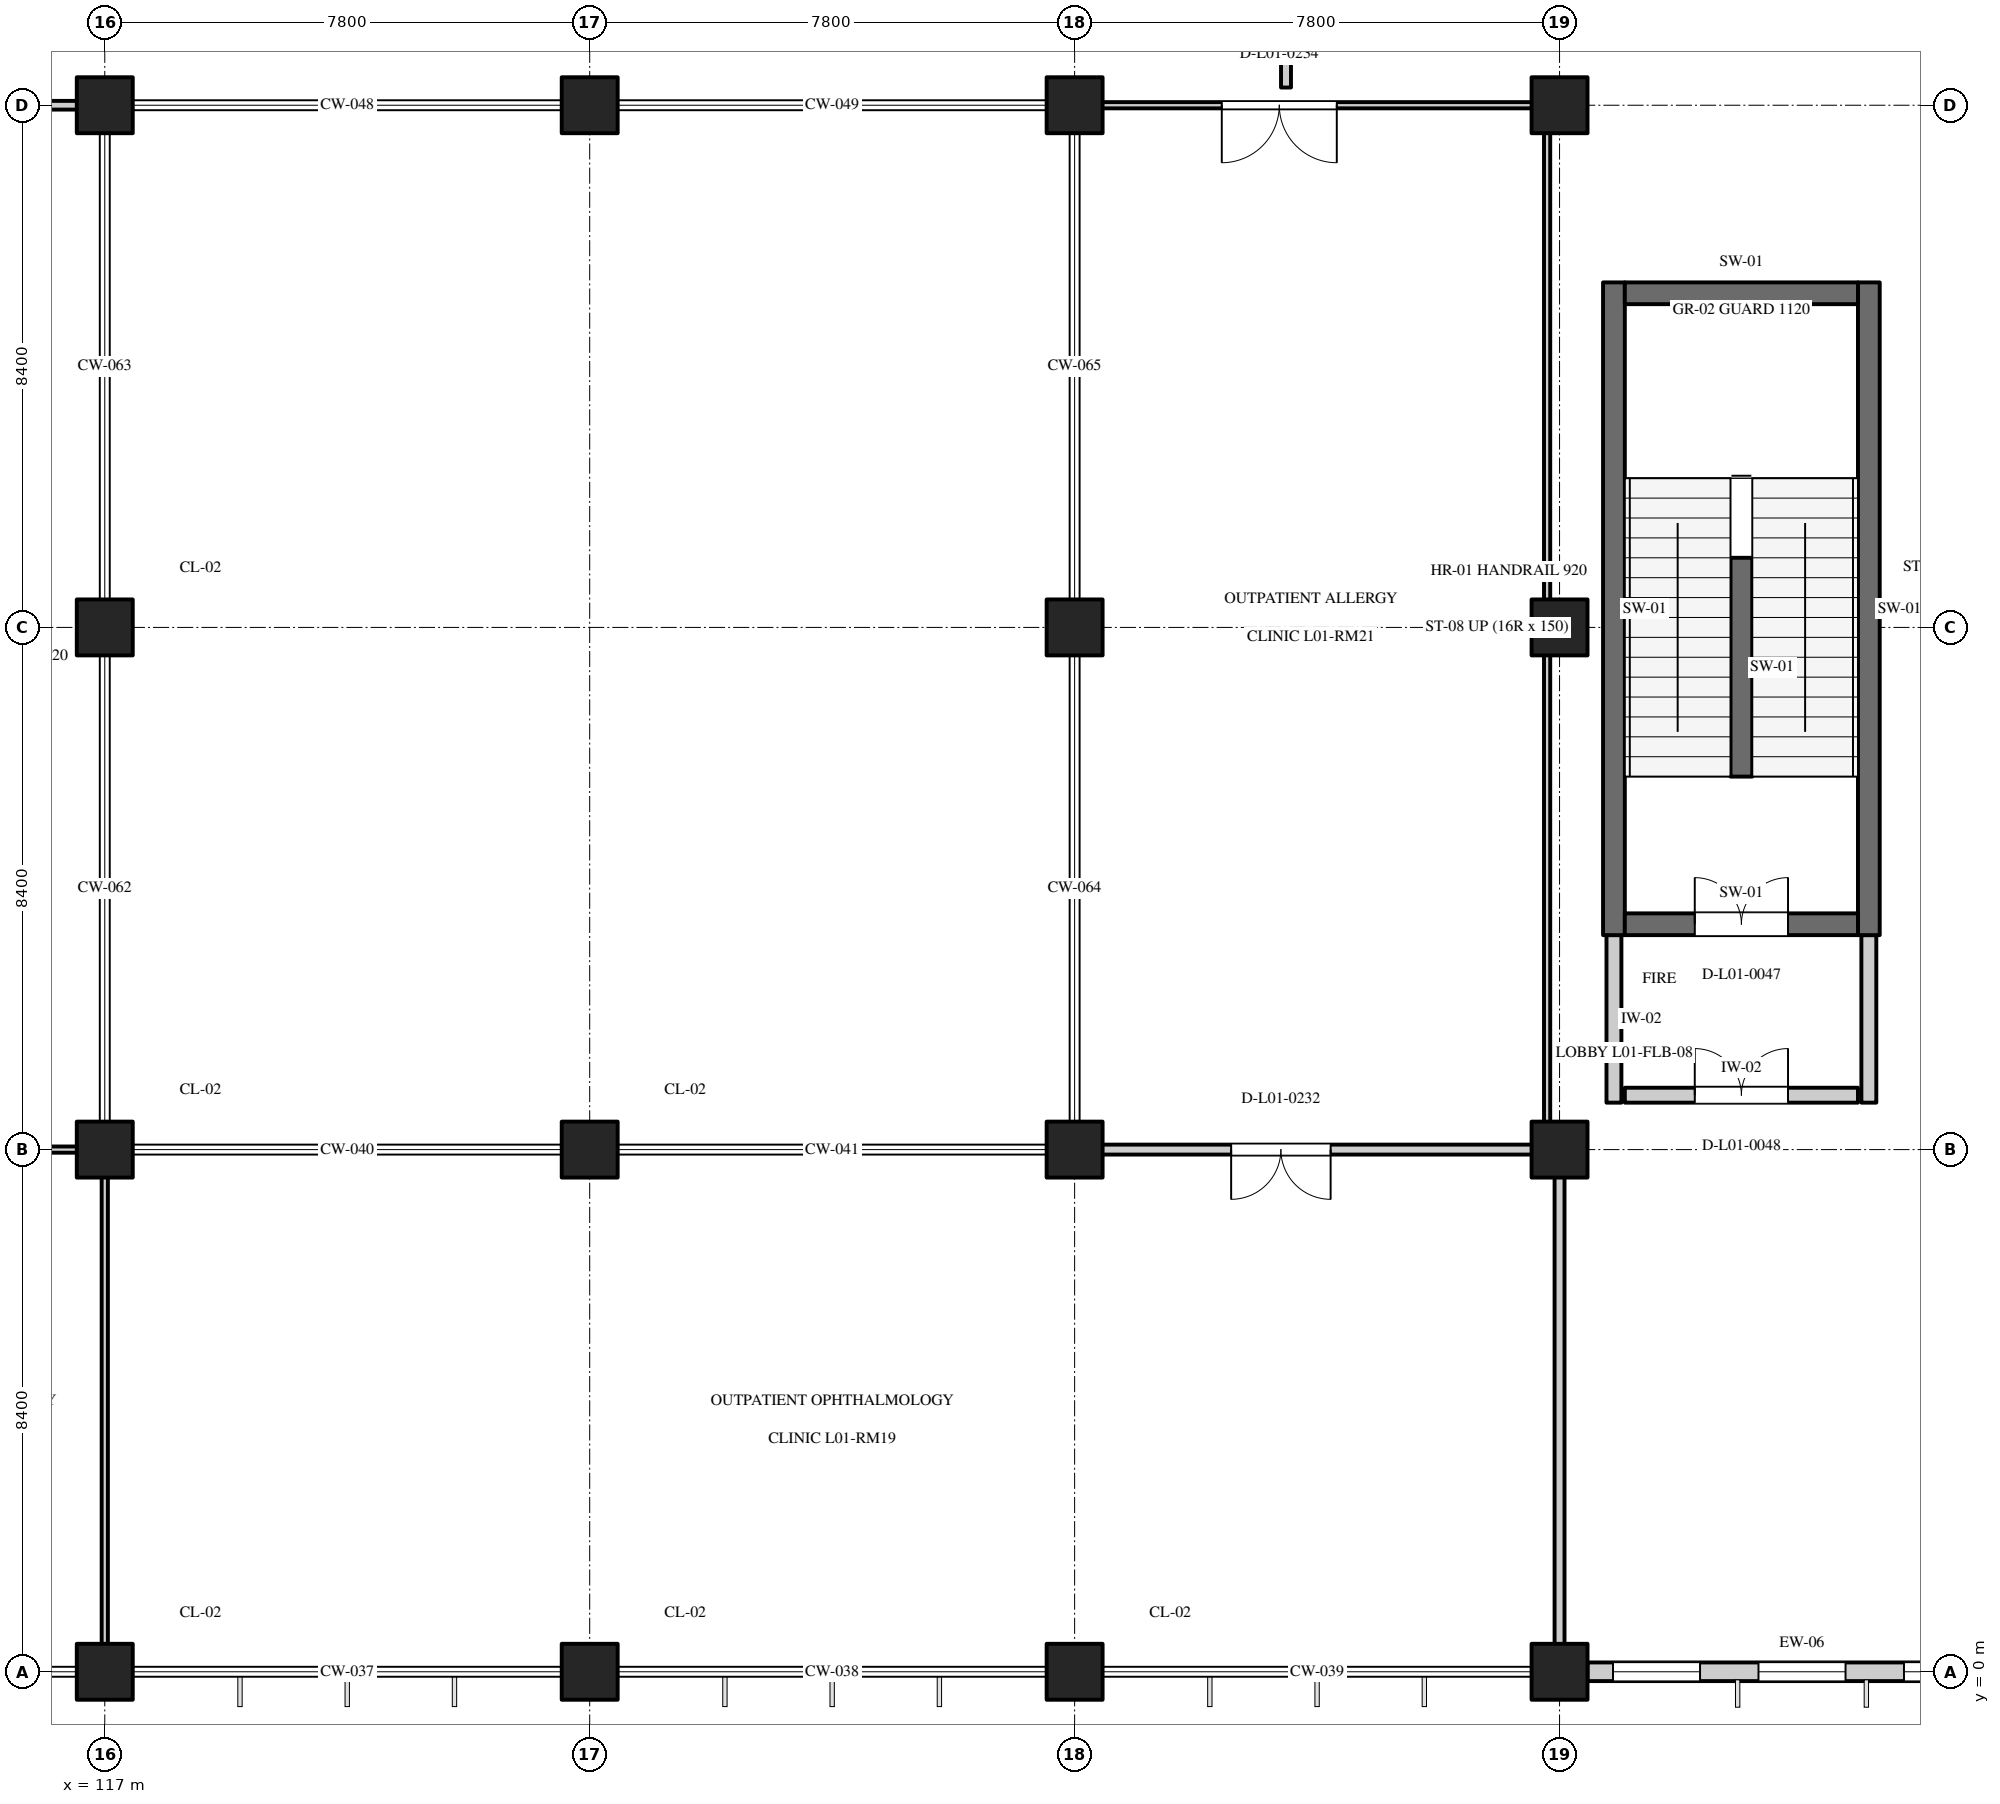
"""IFC4 building model, lengths in metres.
Left out: names, types, materials, properties, quantities, classifications, styles, units other than length and angle.
Written with IfcOpenShell. Run it as: python <this file> out.ifc"""

import sys

from ifc_helpers import new_model, si_unit, direction, frame, frame_2d, origin, origin_2d, place, context, subcontext, project, spatial, rectangle, extrude, element, fill, save


model = new_model("IFC4")
c1 = context("Model", 3, precision=1e-05, world=origin(), true_north=direction((0.0, 1.0)))
c2 = subcontext(c1, "Body", "Model", "MODEL_VIEW")
j1 = project(units=[si_unit("LENGTHUNIT", "METRE"), si_unit("PLANEANGLEUNIT", "RADIAN")], contexts=[c1])
p1 = place(None, origin())
s1 = spatial("IfcSite", under=j1, at=p1, CompositionType="ELEMENT")
p2 = place(p1, origin())
s2 = spatial("IfcBuilding", under=s1, at=p2, CompositionType="ELEMENT")
p3 = place(p2, frame((0.0, 0.0, 4.8)))
s3 = spatial("IfcBuildingStorey", under=s2, at=p3, CompositionType="ELEMENT", Elevation=4.8)
for number, where, z_axis, x_axis in (
    (1, (117.0, 0.0, 0.0), (0.0, 0.0, 1.0), (1.0, 0.0, 0.0)),
    (2, (117.0, 8.4, 0.0), (0.0, 0.0, 1.0), (1.0, 0.0, 0.0)),
    (3, (117.0, 16.8, 0.0), (0.0, 0.0, 1.0), (1.0, 0.0, 0.0)),
    (4, (117.0, 25.2, 0.0), (0.0, 0.0, 1.0), (1.0, 0.0, 0.0)),
    (5, (124.8, 0.0, 0.0), (0.0, 0.0, 1.0), (1.0, 0.0, 0.0)),
    (6, (124.8, 8.4, 0.0), (0.0, 0.0, 1.0), (1.0, 0.0, 0.0)),
    (7, (124.8, 25.2, 0.0), (0.0, 0.0, 1.0), (1.0, 0.0, 0.0)),
    (8, (132.6, 0.0, 0.0), (0.0, 0.0, 1.0), (1.0, 0.0, 0.0)),
    (9, (132.6, 8.4, 0.0), (0.0, 0.0, 1.0), (1.0, 0.0, 0.0)),
    (10, (132.6, 16.8, 0.0), (0.0, 0.0, 1.0), (1.0, 0.0, 0.0)),
    (11, (132.6, 25.2, 0.0), (0.0, 0.0, 1.0), (1.0, 0.0, 0.0)),
    (12, (140.4, 0.0, 0.0), (0.0, 0.0, 1.0), (1.0, 0.0, 0.0)),
    (13, (140.4, 8.4, 0.0), (0.0, 0.0, 1.0), (1.0, 0.0, 0.0)),
    (14, (140.4, 16.8, 0.0), (0.0, 0.0, 1.0), (1.0, 0.0, 0.0)),
    (15, (140.4, 25.2, 0.0), (0.0, 0.0, 1.0), (1.0, 0.0, 0.0)),
):
    element("IfcColumn", number, at=place(p3, frame(where, z_axis=z_axis, x_axis=x_axis)), inside=s3, PredefinedType="COLUMN", context=c2, shape_type="SweptSolid", body=[
        extrude(rectangle(XDim=0.9, YDim=0.9, at=origin_2d()), origin(), (0.0, 0.0, 1.0), 4.8),
    ])
p4 = place(p3, frame((140.85, 0.0, 0.0), z_axis=(0.0, 0.0, 1.0), x_axis=(1.0, 0.0, 0.0)))
e16 = element("IfcWall", 16, at=p4, inside=s3, PredefinedType="STANDARD", context=c2, shape_type="SweptSolid", body=[
    extrude(rectangle(XDim=6.9, YDim=0.3, at=frame_2d((3.45, 0.0))), origin(), (0.0, 0.0, 1.0), 3.75),
])
p5 = place(p4, frame((0.41, 0.0, 0.75)))
e17 = element("IfcOpeningElement", 17, at=p5, cuts=e16, PredefinedType="OPENING", context=c2, shape_type="SweptSolid", body=[
    extrude(rectangle(XDim=1.4, YDim=1.6, at=frame_2d((0.7, 0.8))), frame((0.0, 0.162, 0.0), z_axis=(0.0, -1.0, 0.0), x_axis=(1.0, 0.0, 0.0)), (0.0, 0.0, 1.0), 0.324),
])
p6 = place(p4, frame((2.75, 0.0, 0.75)))
e18 = element("IfcOpeningElement", 18, at=p6, cuts=e16, PredefinedType="OPENING", context=c2, shape_type="SweptSolid", body=[
    extrude(rectangle(XDim=1.4, YDim=1.6, at=frame_2d((0.7, 0.8))), frame((0.0, 0.162, 0.0), z_axis=(0.0, -1.0, 0.0), x_axis=(1.0, 0.0, 0.0)), (0.0, 0.0, 1.0), 0.324),
])
p7 = place(p4, frame((5.09, 0.0, 0.75)))
e19 = element("IfcOpeningElement", 19, at=p7, cuts=e16, PredefinedType="OPENING", context=c2, shape_type="SweptSolid", body=[
    extrude(rectangle(XDim=1.4, YDim=1.6, at=frame_2d((0.7, 0.8))), frame((0.0, 0.162, 0.0), z_axis=(0.0, -1.0, 0.0), x_axis=(1.0, 0.0, 0.0)), (0.0, 0.0, 1.0), 0.324),
])
for number, where, z_axis, x_axis in (
    (20, (141.275, 11.85, 0.0), (0.0, 0.0, 1.0), (0.0, 1.0, 0.0)),
    (21, (145.375, 11.85, 0.0), (0.0, 0.0, 1.0), (0.0, 1.0, 0.0)),
):
    element("IfcWall", number, at=place(p3, frame(where, z_axis=z_axis, x_axis=x_axis)), inside=s3, PredefinedType="SHEAR", context=c2, shape_type="SweptSolid", body=[
        extrude(rectangle(XDim=10.5, YDim=0.35, at=frame_2d((5.25, 0.0))), origin(), (0.0, 0.0, 1.0), 4.8),
    ])
p8 = place(p3, frame((141.45, 22.175, 0.0), z_axis=(0.0, 0.0, 1.0), x_axis=(1.0, 0.0, 0.0)))
e22 = element("IfcWall", 22, at=p8, inside=s3, PredefinedType="SHEAR", context=c2, shape_type="SweptSolid", body=[
    extrude(rectangle(XDim=3.75, YDim=0.35, at=frame_2d((1.875, 0.0))), origin(), (0.0, 0.0, 1.0), 4.8),
])
p9 = place(p3, frame((141.45, 12.025, 0.0), z_axis=(0.0, 0.0, 1.0), x_axis=(1.0, 0.0, 0.0)))
e23 = element("IfcWall", 23, at=p9, inside=s3, PredefinedType="SHEAR", context=c2, shape_type="SweptSolid", body=[
    extrude(rectangle(XDim=3.75, YDim=0.35, at=frame_2d((1.875, 0.0))), origin(), (0.0, 0.0, 1.0), 4.45),
])
p10 = place(p9, frame((1.125, 0.0, 0.0)))
e24 = element("IfcOpeningElement", 24, at=p10, cuts=e23, PredefinedType="OPENING", context=c2, shape_type="SweptSolid", body=[
    extrude(rectangle(XDim=1.5, YDim=2.2, at=frame_2d((0.75, 1.1))), frame((0.0, 0.187, 0.0), z_axis=(0.0, -1.0, 0.0), x_axis=(1.0, 0.0, 0.0)), (0.0, 0.0, 1.0), 0.374),
])
for number, where, z_axis, x_axis in (
    (25, (141.275, 9.155, 0.0), (0.0, 0.0, 1.0), (0.0, 1.0, 0.0)),
    (26, (145.375, 9.155, 0.0), (0.0, 0.0, 1.0), (0.0, 1.0, 0.0)),
):
    element("IfcWall", number, at=place(p3, frame(where, z_axis=z_axis, x_axis=x_axis)), inside=s3, PredefinedType="STANDARD", context=c2, shape_type="SweptSolid", body=[
        extrude(rectangle(XDim=2.695, YDim=0.24, at=frame_2d((1.348, 0.0))), origin(), (0.0, 0.0, 1.0), 4.45),
    ])
p11 = place(p3, frame((141.45, 9.275, 0.0), z_axis=(0.0, 0.0, 1.0), x_axis=(1.0, 0.0, 0.0)))
e27 = element("IfcWall", 27, at=p11, inside=s3, PredefinedType="STANDARD", context=c2, shape_type="SweptSolid", body=[
    extrude(rectangle(XDim=3.75, YDim=0.24, at=frame_2d((1.875, 0.0))), origin(), (0.0, 0.0, 1.0), 4.45),
])
p12 = place(p11, frame((1.125, 0.0, 0.0)))
e28 = element("IfcOpeningElement", 28, at=p12, cuts=e27, PredefinedType="OPENING", context=c2, shape_type="SweptSolid", body=[
    extrude(rectangle(XDim=1.5, YDim=2.2, at=frame_2d((0.75, 1.1))), frame((0.0, 0.132, 0.0), z_axis=(0.0, -1.0, 0.0), x_axis=(1.0, 0.0, 0.0)), (0.0, 0.0, 1.0), 0.264),
])
p13 = place(p3, frame((143.325, 14.4, 0.0), z_axis=(0.0, 0.0, 1.0), x_axis=(0.0, 1.0, 0.0)))
e29 = element("IfcWall", 29, at=p13, inside=s3, PredefinedType="SHEAR", context=c2, shape_type="SweptSolid", body=[
    extrude(rectangle(XDim=3.52, YDim=0.35, at=frame_2d((1.76, 0.0))), origin(), (0.0, 0.0, 1.0), 4.8),
])
p14 = place(p3, frame((101.485, 8.4, 0.0), z_axis=(0.0, 0.0, 1.0), x_axis=(1.0, 0.0, 0.0)))
e30 = element("IfcWall", 30, at=p14, inside=s3, PredefinedType="PARTITIONING", context=c2, shape_type="SweptSolid", body=[
    extrude(rectangle(XDim=15.43, YDim=0.1, at=frame_2d((7.715, 0.0))), origin(), (0.0, 0.0, 1.0), 4.43),
])
p15 = place(p14, frame((2.331, 0.0, 0.0)))
e31 = element("IfcOpeningElement", 31, at=p15, cuts=e30, PredefinedType="OPENING", context=c2, shape_type="SweptSolid", body=[
    extrude(rectangle(XDim=1.75, YDim=2.3, at=frame_2d((0.875, 1.15))), frame((0.0, 0.062, 0.0), z_axis=(0.0, -1.0, 0.0), x_axis=(1.0, 0.0, 0.0)), (0.0, 0.0, 1.0), 0.124),
])
p16 = place(p3, frame((117.0, 0.085, 0.0), z_axis=(0.0, 0.0, 1.0), x_axis=(0.0, 1.0, 0.0)))
e32 = element("IfcWall", 32, at=p16, inside=s3, PredefinedType="PARTITIONING", context=c2, shape_type="SweptSolid", body=[
    extrude(rectangle(XDim=8.23, YDim=0.1, at=frame_2d((4.115, 0.0))), origin(), (0.0, 0.0, 1.0), 3.7),
])
p17 = place(p3, frame((124.39, 8.4, 0.0), z_axis=(0.0, 0.0, 1.0), x_axis=(1.0, 0.0, 0.0)))
e33 = element("IfcWall", 33, at=p17, inside=s3, PredefinedType="PARTITIONING", context=c2, shape_type="SweptSolid", body=[
    extrude(rectangle(XDim=0.82, YDim=0.16, at=frame_2d((0.41, 0.0))), origin(), (0.0, 0.0, 1.0), 4.43),
])
p18 = place(p3, frame((132.19, 8.4, 0.0), z_axis=(0.0, 0.0, 1.0), x_axis=(1.0, 0.0, 0.0)))
e34 = element("IfcWall", 34, at=p18, inside=s3, PredefinedType="PARTITIONING", context=c2, shape_type="SweptSolid", body=[
    extrude(rectangle(XDim=8.125, YDim=0.16, at=frame_2d((4.062, 0.0))), origin(), (0.0, 0.0, 1.0), 4.43),
])
p19 = place(p18, frame((2.928, 0.0, 0.0)))
e35 = element("IfcOpeningElement", 35, at=p19, cuts=e34, PredefinedType="OPENING", context=c2, shape_type="SweptSolid", body=[
    extrude(rectangle(XDim=1.6, YDim=2.25, at=frame_2d((0.8, 1.125))), frame((0.0, 0.092, 0.0), z_axis=(0.0, -1.0, 0.0), x_axis=(1.0, 0.0, 0.0)), (0.0, 0.0, 1.0), 0.184),
])
for number, where, z_axis, x_axis in (
    (36, (124.39, 0.0, 0.0), (0.0, 0.0, 1.0), (1.0, 0.0, 0.0)),
    (37, (132.19, 0.0, 0.0), (0.0, 0.0, 1.0), (1.0, 0.0, 0.0)),
):
    element("IfcWall", number, at=place(p3, frame(where, z_axis=z_axis, x_axis=x_axis)), inside=s3, PredefinedType="PARTITIONING", context=c2, shape_type="SweptSolid", body=[
        extrude(rectangle(XDim=0.82, YDim=0.16, at=frame_2d((0.41, 0.0))), origin(), (0.0, 0.0, 1.0), 3.7),
    ])
p20 = place(p3, frame((140.4, 0.085, 0.0), z_axis=(0.0, 0.0, 1.0), x_axis=(0.0, 1.0, 0.0)))
e38 = element("IfcWall", 38, at=p20, inside=s3, PredefinedType="PARTITIONING", context=c2, shape_type="SweptSolid", body=[
    extrude(rectangle(XDim=8.23, YDim=0.16, at=frame_2d((4.115, 0.0))), origin(), (0.0, 0.0, 1.0), 4.43),
])
p21 = place(p3, frame((101.485, 25.2, 0.0), z_axis=(0.0, 0.0, 1.0), x_axis=(1.0, 0.0, 0.0)))
e39 = element("IfcWall", 39, at=p21, inside=s3, PredefinedType="PARTITIONING", context=c2, shape_type="SweptSolid", body=[
    extrude(rectangle(XDim=15.43, YDim=0.14, at=frame_2d((7.715, 0.0))), origin(), (0.0, 0.0, 1.0), 3.7),
])
p22 = place(p21, frame((2.332, 0.0, 0.0)))
e40 = element("IfcOpeningElement", 40, at=p22, cuts=e39, PredefinedType="OPENING", context=c2, shape_type="SweptSolid", body=[
    extrude(rectangle(XDim=1.4, YDim=2.25, at=frame_2d((0.7, 1.125))), frame((0.0, 0.082, 0.0), z_axis=(0.0, -1.0, 0.0), x_axis=(1.0, 0.0, 0.0)), (0.0, 0.0, 1.0), 0.164),
])
p23 = place(p3, frame((117.0, 16.39, 0.0), z_axis=(0.0, 0.0, 1.0), x_axis=(0.0, 1.0, 0.0)))
e41 = element("IfcWall", 41, at=p23, inside=s3, PredefinedType="PARTITIONING", context=c2, shape_type="SweptSolid", body=[
    extrude(rectangle(XDim=0.82, YDim=0.14, at=frame_2d((0.41, 0.0))), origin(), (0.0, 0.0, 1.0), 3.7),
])
p24 = place(p3, frame((132.685, 25.2, 0.0), z_axis=(0.0, 0.0, 1.0), x_axis=(1.0, 0.0, 0.0)))
e42 = element("IfcWall", 42, at=p24, inside=s3, PredefinedType="PARTITIONING", context=c2, shape_type="SweptSolid", body=[
    extrude(rectangle(XDim=7.43, YDim=0.1, at=frame_2d((3.715, 0.0))), origin(), (0.0, 0.0, 1.0), 3.7),
])
p25 = place(p24, frame((2.282, 0.0, 0.0)))
e43 = element("IfcOpeningElement", 43, at=p25, cuts=e42, PredefinedType="OPENING", context=c2, shape_type="SweptSolid", body=[
    extrude(rectangle(XDim=1.85, YDim=2.3, at=frame_2d((0.925, 1.15))), frame((0.0, 0.062, 0.0), z_axis=(0.0, -1.0, 0.0), x_axis=(1.0, 0.0, 0.0)), (0.0, 0.0, 1.0), 0.124),
])
p26 = place(p3, frame((132.6, 16.39, 0.0), z_axis=(0.0, 0.0, 1.0), x_axis=(0.0, 1.0, 0.0)))
e44 = element("IfcWall", 44, at=p26, inside=s3, PredefinedType="PARTITIONING", context=c2, shape_type="SweptSolid", body=[
    extrude(rectangle(XDim=0.82, YDim=0.1, at=frame_2d((0.41, 0.0))), origin(), (0.0, 0.0, 1.0), 3.7),
])
p27 = place(p3, frame((140.2, 8.485, 0.0), z_axis=(0.0, 0.0, 1.0), x_axis=(0.0, 1.0, 0.0)))
e45 = element("IfcWall", 45, at=p27, inside=s3, PredefinedType="PARTITIONING", context=c2, shape_type="SweptSolid", body=[
    extrude(rectangle(XDim=16.63, YDim=0.1, at=frame_2d((8.315, 0.0))), origin(), (0.0, 0.0, 1.0), 4.43),
])
p28 = place(p3, frame((116.955, 25.4, 0.0), z_axis=(0.0, 0.0, 1.0), x_axis=(1.0, 0.0, 0.0)))
e46 = element("IfcWall", 46, at=p28, inside=s3, PredefinedType="PARTITIONING", context=c2, shape_type="SweptSolid", body=[
    extrude(rectangle(XDim=0.455, YDim=0.16, at=frame_2d((0.228, 0.0))), origin(), (0.0, 0.0, 1.0), 3.7),
])
p29 = place(p3, frame((124.39, 25.4, 0.0), z_axis=(0.0, 0.0, 1.0), x_axis=(1.0, 0.0, 0.0)))
e47 = element("IfcWall", 47, at=p29, inside=s3, PredefinedType="PARTITIONING", context=c2, shape_type="SweptSolid", body=[
    extrude(rectangle(XDim=0.82, YDim=0.16, at=frame_2d((0.41, 0.0))), origin(), (0.0, 0.0, 1.0), 3.7),
])
p30 = place(p3, frame((132.19, 25.4, 0.0), z_axis=(0.0, 0.0, 1.0), x_axis=(1.0, 0.0, 0.0)))
e48 = element("IfcWall", 48, at=p30, inside=s3, PredefinedType="PARTITIONING", context=c2, shape_type="SweptSolid", body=[
    extrude(rectangle(XDim=0.455, YDim=0.16, at=frame_2d((0.228, 0.0))), origin(), (0.0, 0.0, 1.0), 3.7),
])
p31 = place(p3, frame((136.0, 25.485, 0.0), z_axis=(0.0, 0.0, 1.0), x_axis=(0.0, 1.0, 0.0)))
e49 = element("IfcWall", 49, at=p31, inside=s3, PredefinedType="PARTITIONING", context=c2, shape_type="SweptSolid", body=[
    extrude(rectangle(XDim=8.03, YDim=0.16, at=frame_2d((4.015, 0.0))), origin(), (0.0, 0.0, 1.0), 4.43),
])
p32 = place(p5, origin())
e50 = element("IfcWindow", 50, at=p32, inside=s3, PartitioningType="SINGLE_PANEL", PredefinedType="WINDOW", context=c2, shape_type="SweptSolid", body=[
    extrude(rectangle(XDim=1.4, YDim=1.6, at=frame_2d((0.7, 0.8))), frame((0.0, 0.03, 0.0), z_axis=(0.0, -1.0, 0.0), x_axis=(1.0, 0.0, 0.0)), (0.0, 0.0, 1.0), 0.06),
])
fill(e17, e50)
p33 = place(p6, origin())
e51 = element("IfcWindow", 51, at=p33, inside=s3, PartitioningType="SINGLE_PANEL", PredefinedType="WINDOW", context=c2, shape_type="SweptSolid", body=[
    extrude(rectangle(XDim=1.4, YDim=1.6, at=frame_2d((0.7, 0.8))), frame((0.0, 0.03, 0.0), z_axis=(0.0, -1.0, 0.0), x_axis=(1.0, 0.0, 0.0)), (0.0, 0.0, 1.0), 0.06),
])
fill(e18, e51)
p34 = place(p7, origin())
e52 = element("IfcWindow", 52, at=p34, inside=s3, PartitioningType="SINGLE_PANEL", PredefinedType="WINDOW", context=c2, shape_type="SweptSolid", body=[
    extrude(rectangle(XDim=1.4, YDim=1.6, at=frame_2d((0.7, 0.8))), frame((0.0, 0.03, 0.0), z_axis=(0.0, -1.0, 0.0), x_axis=(1.0, 0.0, 0.0)), (0.0, 0.0, 1.0), 0.06),
])
fill(e19, e52)
p35 = place(p10, origin())
e53 = element("IfcDoor", 53, at=p35, inside=s3, OperationType="DOUBLE_DOOR_SINGLE_SWING", PredefinedType="DOOR", context=c2, shape_type="SweptSolid", body=[
    extrude(rectangle(XDim=1.5, YDim=2.2, at=frame_2d((0.75, 1.1))), frame((0.0, 0.025, 0.0), z_axis=(0.0, -1.0, 0.0), x_axis=(1.0, 0.0, 0.0)), (0.0, 0.0, 1.0), 0.05),
])
fill(e24, e53)
p36 = place(p12, origin())
e54 = element("IfcDoor", 54, at=p36, inside=s3, OperationType="DOUBLE_DOOR_SINGLE_SWING", PredefinedType="DOOR", context=c2, shape_type="SweptSolid", body=[
    extrude(rectangle(XDim=1.5, YDim=2.2, at=frame_2d((0.75, 1.1))), frame((0.0, 0.025, 0.0), z_axis=(0.0, -1.0, 0.0), x_axis=(1.0, 0.0, 0.0)), (0.0, 0.0, 1.0), 0.05),
])
fill(e28, e54)
p37 = place(p19, frame((1.6, 0.0, 0.0), z_axis=(0.0, 0.0, 1.0), x_axis=(-1.0, 0.0, 0.0)))
e55 = element("IfcDoor", 55, at=p37, inside=s3, OperationType="DOUBLE_DOOR_SINGLE_SWING", PredefinedType="DOOR", context=c2, shape_type="SweptSolid", body=[
    extrude(rectangle(XDim=1.6, YDim=2.25, at=frame_2d((0.8, 1.125))), frame((0.0, 0.025, 0.0), z_axis=(0.0, -1.0, 0.0), x_axis=(1.0, 0.0, 0.0)), (0.0, 0.0, 1.0), 0.05),
])
fill(e35, e55)
p38 = place(p25, frame((1.85, 0.0, 0.0), z_axis=(0.0, 0.0, 1.0), x_axis=(-1.0, 0.0, 0.0)))
e56 = element("IfcDoor", 56, at=p38, inside=s3, OperationType="DOUBLE_DOOR_SINGLE_SWING", PredefinedType="DOOR", context=c2, shape_type="SweptSolid", body=[
    extrude(rectangle(XDim=1.85, YDim=2.3, at=frame_2d((0.925, 1.15))), frame((0.0, 0.025, 0.0), z_axis=(0.0, -1.0, 0.0), x_axis=(1.0, 0.0, 0.0)), (0.0, 0.0, 1.0), 0.05),
])
fill(e43, e56)
save(model, sys.argv[1])
